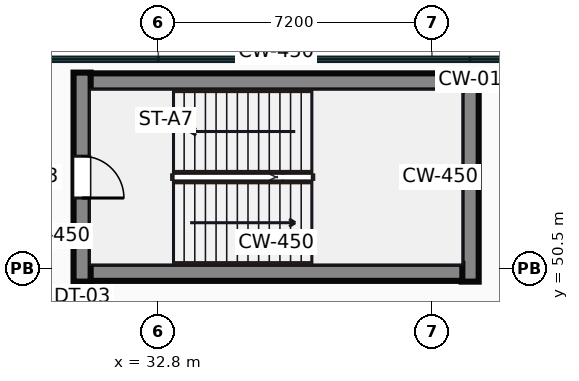
"""IFC4 building model, lengths in metres.
Left out: names, types, materials, properties, quantities, classifications, styles, units other than length and angle.
Written with IfcOpenShell. Run it as: python <this file> out.ifc"""

import sys

from ifc_helpers import new_model, si_unit, direction, frame, frame_2d, origin, place, context, subcontext, project, spatial, rectangle, extrude, source, transform, mapped, element, fill, save


model = new_model("IFC4")
c1 = context("Model", 3, precision=1e-05, world=origin(), true_north=direction((0.0, 1.0)))
c2 = subcontext(c1, "Body", "Model", "MODEL_VIEW")
j1 = project(units=[si_unit("LENGTHUNIT", "METRE"), si_unit("PLANEANGLEUNIT", "RADIAN")], contexts=[c1])
p1 = place(None, origin())
s1 = spatial("IfcSite", under=j1, at=p1, CompositionType="ELEMENT")
p2 = place(p1, origin())
s2 = spatial("IfcBuilding", under=s1, at=p2, CompositionType="ELEMENT")
p3 = place(p2, frame((0.0, 0.0, 11.0)))
s3 = spatial("IfcBuildingStorey", under=s2, at=p3, CompositionType="ELEMENT", Elevation=11.0)
m1 = source(origin(), c2, "Body", "SweptSolid", [
    extrude(rectangle(XDim=5.5, YDim=0.45, at=frame_2d((2.75, 0.0))), origin(), (0.0, 0.0, 1.0), 5.0),
])
p4 = place(p3, frame((30.795, 50.15, 0.0), z_axis=(0.0, 0.0, 1.0), x_axis=(0.0, 1.0, 0.0)))
e1 = element("IfcWall", 1, at=p4, inside=s3, PredefinedType="SHEAR", context=c2, shape_type="MappedRepresentation", body=[
    mapped(m1, transform((0.0, 0.0, 0.0))),
])
p5 = place(p4, frame((2.2, 0.0, 0.0)))
e2 = element("IfcOpeningElement", 2, at=p5, cuts=e1, PredefinedType="OPENING", context=c2, shape_type="SweptSolid", body=[
    extrude(rectangle(XDim=1.1, YDim=2.15, at=frame_2d((0.55, 1.075))), frame((0.0, 0.235, 0.0), z_axis=(0.0, -1.0, 0.0), x_axis=(1.0, 0.0, 0.0)), (0.0, 0.0, 1.0), 0.47),
])
m2 = source(origin(), c2, "Body", "SweptSolid", [
    extrude(rectangle(XDim=9.8, YDim=0.45, at=frame_2d((4.9, 0.0))), origin(), (0.0, 0.0, 1.0), 5.0),
])
for number, where, z_axis, x_axis in (
    (3, (31.0, 50.395, 0.0), (0.0, 0.0, 1.0), (1.0, 0.0, 0.0)),
    (4, (31.0, 55.405, 0.0), (0.0, 0.0, 1.0), (1.0, 0.0, 0.0)),
):
    element("IfcWall", number, at=place(p3, frame(where, z_axis=z_axis, x_axis=x_axis)), inside=s3, PredefinedType="SHEAR", context=c2, shape_type="MappedRepresentation", body=[
        mapped(m2, transform((0.0, 0.0, 0.0))),
    ])
p6 = place(p3, frame((41.005, 50.15, 0.0), z_axis=(0.0, 0.0, 1.0), x_axis=(0.0, 1.0, 0.0)))
e5 = element("IfcWall", 5, at=p6, inside=s3, PredefinedType="SHEAR", context=c2, shape_type="MappedRepresentation", body=[
    mapped(m1, transform((0.0, 0.0, 0.0))),
])
m3 = source(origin(), c2, "Body", "SweptSolid", [
    extrude(rectangle(XDim=1.1, YDim=2.15, at=frame_2d((0.55, 1.075))), frame((0.0, 0.025, 0.0), z_axis=(0.0, -1.0, 0.0), x_axis=(1.0, 0.0, 0.0)), (0.0, 0.0, 1.0), 0.05),
])
p7 = place(p5, frame((1.1, 0.0, 0.0), z_axis=(0.0, 0.0, 1.0), x_axis=(-1.0, 0.0, 0.0)))
e6 = element("IfcDoor", 6, at=p7, inside=s3, OperationType="SINGLE_SWING_LEFT", PredefinedType="DOOR", context=c2, shape_type="MappedRepresentation", body=[
    mapped(m3, transform((0.0, 0.0, 0.0))),
])
fill(e2, e6)
save(model, sys.argv[1])
